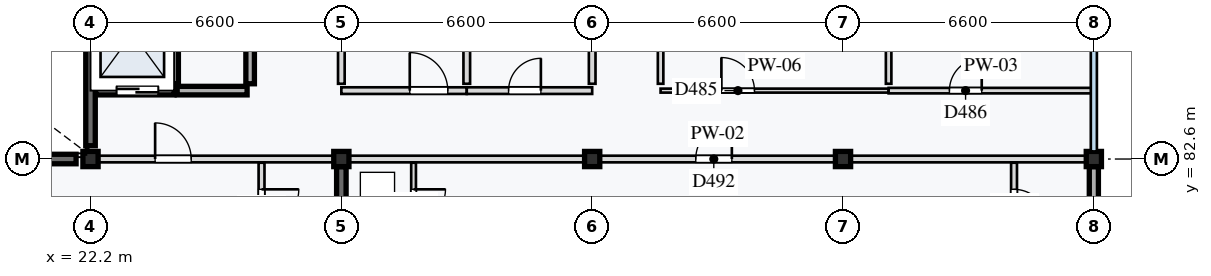
"""IFC4 building model, lengths in metres.
Left out: names, types, materials, properties, quantities, classifications, styles, units other than length and angle.
Written with IfcOpenShell. Run it as: python <this file> out.ifc"""

import sys

from ifc_helpers import new_model, si_unit, direction, frame, frame_2d, origin, origin_2d, place, context, subcontext, project, spatial, rectangle, extrude, element, fill, save


model = new_model("IFC4")
c1 = context("Model", 3, precision=1e-05, world=origin(), true_north=direction((0.0, 1.0)))
c2 = subcontext(c1, "Body", "Model", "MODEL_VIEW")
j1 = project(units=[si_unit("LENGTHUNIT", "METRE"), si_unit("PLANEANGLEUNIT", "RADIAN")], contexts=[c1])
p1 = place(None, origin())
s1 = spatial("IfcSite", under=j1, at=p1, CompositionType="ELEMENT")
p2 = place(p1, origin())
s2 = spatial("IfcBuilding", under=s1, at=p2, CompositionType="ELEMENT")
p3 = place(p2, frame((0.0, 0.0, 50.0)))
s3 = spatial("IfcBuildingStorey", under=s2, at=p3, CompositionType="ELEMENT", Elevation=50.0)
for number, where, z_axis, x_axis in (
    (1, (22.2, 82.6, 0.0), (0.0, 0.0, 1.0), (1.0, 0.0, 0.0)),
    (2, (28.8, 82.6, 0.0), (0.0, 0.0, 1.0), (1.0, 0.0, 0.0)),
    (3, (35.4, 82.6, 0.0), (0.0, 0.0, 1.0), (1.0, 0.0, 0.0)),
    (4, (42.0, 82.6, 0.0), (0.0, 0.0, 1.0), (1.0, 0.0, 0.0)),
    (5, (48.6, 82.6, 0.0), (0.0, 0.0, 1.0), (1.0, 0.0, 0.0)),
):
    element("IfcColumn", number, at=place(p3, frame(where, z_axis=z_axis, x_axis=x_axis)), inside=s3, PredefinedType="COLUMN", context=c2, shape_type="SweptSolid", body=[
        extrude(rectangle(XDim=0.4, YDim=0.4, at=origin_2d()), origin(), (0.0, 0.0, 1.0), 3.2),
    ])
p4 = place(p3, frame((15.98, 82.6, 0.0), z_axis=(0.0, 0.0, 1.0), x_axis=(1.0, 0.0, 0.0)))
e6 = element("IfcWall", 6, at=p4, inside=s3, PredefinedType="SHEAR", context=c2, shape_type="SweptSolid", body=[
    extrude(rectangle(XDim=5.84, YDim=0.25, at=frame_2d((2.92, 0.0))), origin(), (0.0, 0.0, 1.0), 2.98),
])
p5 = place(p3, frame((22.2, 82.95, 0.0), z_axis=(0.0, 0.0, 1.0), x_axis=(0.0, 1.0, 0.0)))
e7 = element("IfcWall", 7, at=p5, inside=s3, PredefinedType="SHEAR", context=c2, shape_type="SweptSolid", body=[
    extrude(rectangle(XDim=2.8, YDim=0.25, at=frame_2d((1.4, 0.0))), origin(), (0.0, 0.0, 1.0), 2.98),
])
p6 = place(p3, frame((28.8, 76.2, 0.0), z_axis=(0.0, 0.0, 1.0), x_axis=(0.0, 1.0, 0.0)))
e8 = element("IfcWall", 8, at=p6, inside=s3, PredefinedType="SHEAR", context=c2, shape_type="SweptSolid", body=[
    extrude(rectangle(XDim=6.2, YDim=0.25, at=frame_2d((3.1, 0.0))), origin(), (0.0, 0.0, 1.0), 2.98),
])
p7 = place(p3, frame((48.6, 76.2, 0.0), z_axis=(0.0, 0.0, 1.0), x_axis=(0.0, 1.0, 0.0)))
e9 = element("IfcWall", 9, at=p7, inside=s3, PredefinedType="STANDARD", context=c2, shape_type="SweptSolid", body=[
    extrude(rectangle(XDim=6.2, YDim=0.24, at=frame_2d((3.1, 0.0))), origin(), (0.0, 0.0, 1.0), 2.65),
])
p8 = place(p3, frame((22.335, 84.4, 0.0), z_axis=(0.0, 0.0, 1.0), x_axis=(1.0, 0.0, 0.0)))
e10 = element("IfcWall", 10, at=p8, inside=s3, PredefinedType="STANDARD", context=c2, shape_type="SweptSolid", body=[
    extrude(rectangle(XDim=2.065, YDim=0.225, at=frame_2d((1.032, 0.0))), origin(), (0.0, 0.0, 1.0), 2.98),
])
p9 = place(p8, frame((0.55, 0.0, 0.0)))
e11 = element("IfcOpeningElement", 11, at=p9, cuts=e10, PredefinedType="OPENING", context=c2, shape_type="SweptSolid", body=[
    extrude(rectangle(XDim=1.1, YDim=2.1, at=frame_2d((0.55, 1.05))), frame((0.0, 0.123, 0.0), z_axis=(0.0, -1.0, 0.0), x_axis=(1.0, 0.0, 0.0)), (0.0, 0.0, 1.0), 0.245),
])
p10 = place(p3, frame((24.48, 84.4, 0.0), z_axis=(0.0, 0.0, 1.0), x_axis=(1.0, 0.0, 0.0)))
e12 = element("IfcWall", 12, at=p10, inside=s3, PredefinedType="STANDARD", context=c2, shape_type="SweptSolid", body=[
    extrude(rectangle(XDim=1.84, YDim=0.225, at=frame_2d((0.92, 0.0))), origin(), (0.0, 0.0, 1.0), 2.98),
])
for number, where, z_axis, x_axis in (
    (13, (24.4, 84.58, 0.0), (0.0, 0.0, 1.0), (0.0, 1.0, 0.0)),
    (14, (26.4, 84.58, 0.0), (0.0, 0.0, 1.0), (0.0, 1.0, 0.0)),
):
    element("IfcWall", number, at=place(p3, frame(where, z_axis=z_axis, x_axis=x_axis)), inside=s3, PredefinedType="STANDARD", context=c2, shape_type="SweptSolid", body=[
        extrude(rectangle(XDim=2.64, YDim=0.225, at=frame_2d((1.32, 0.0))), origin(), (0.0, 0.0, 1.0), 2.98),
    ])
p11 = place(p3, frame((28.8, 84.4, 0.0), z_axis=(0.0, 0.0, 1.0), x_axis=(1.0, 0.0, 0.0)))
e15 = element("IfcWall", 15, at=p11, inside=s3, PredefinedType="PARTITIONING", context=c2, shape_type="SweptSolid", body=[
    extrude(rectangle(XDim=3.3, YDim=0.175, at=frame_2d((1.65, 0.0))), origin(), (0.0, 0.0, 1.0), 2.98),
])
p12 = place(p11, frame((1.8, 0.0, 0.0)))
e16 = element("IfcOpeningElement", 16, at=p12, cuts=e15, PredefinedType="OPENING", context=c2, shape_type="SweptSolid", body=[
    extrude(rectangle(XDim=1.0, YDim=2.1, at=frame_2d((0.5, 1.05))), frame((0.0, 0.097, 0.0), z_axis=(0.0, -1.0, 0.0), x_axis=(1.0, 0.0, 0.0)), (0.0, 0.0, 1.0), 0.195),
])
p13 = place(p3, frame((32.1, 84.4, 0.0), z_axis=(0.0, 0.0, 1.0), x_axis=(1.0, 0.0, 0.0)))
e17 = element("IfcWall", 17, at=p13, inside=s3, PredefinedType="PARTITIONING", context=c2, shape_type="SweptSolid", body=[
    extrude(rectangle(XDim=3.3, YDim=0.175, at=frame_2d((1.65, 0.0))), origin(), (0.0, 0.0, 1.0), 2.98),
])
p14 = place(p13, frame((1.1, 0.0, 0.0)))
e18 = element("IfcOpeningElement", 18, at=p14, cuts=e17, PredefinedType="OPENING", context=c2, shape_type="SweptSolid", body=[
    extrude(rectangle(XDim=0.85, YDim=2.0, at=frame_2d((0.425, 1.0))), frame((0.0, 0.097, 0.0), z_axis=(0.0, -1.0, 0.0), x_axis=(1.0, 0.0, 0.0)), (0.0, 0.0, 1.0), 0.195),
])
for number, where, z_axis, x_axis in (
    (19, (28.8, 84.58, 0.0), (0.0, 0.0, 1.0), (0.0, 1.0, 0.0)),
    (20, (32.1, 84.58, 0.0), (0.0, 0.0, 1.0), (0.0, 1.0, 0.0)),
    (21, (35.4, 84.58, 0.0), (0.0, 0.0, 1.0), (0.0, 1.0, 0.0)),
):
    element("IfcWall", number, at=place(p3, frame(where, z_axis=z_axis, x_axis=x_axis)), inside=s3, PredefinedType="PARTITIONING", context=c2, shape_type="SweptSolid", body=[
        extrude(rectangle(XDim=1.14, YDim=0.175, at=frame_2d((0.57, 0.0))), origin(), (0.0, 0.0, 1.0), 2.98),
    ])
p15 = place(p3, frame((37.2, 84.4, 0.0), z_axis=(0.0, 0.0, 1.0), x_axis=(1.0, 0.0, 0.0)))
e22 = element("IfcWall", 22, at=p15, inside=s3, PredefinedType="PARTITIONING", context=c2, shape_type="SweptSolid", body=[
    extrude(rectangle(XDim=6.0, YDim=0.105, at=frame_2d((3.0, 0.0))), origin(), (0.0, 0.0, 1.0), 2.98),
])
p16 = place(p15, frame((1.6, 0.0, 0.0)))
e23 = element("IfcOpeningElement", 23, at=p16, cuts=e22, PredefinedType="OPENING", context=c2, shape_type="SweptSolid", body=[
    extrude(rectangle(XDim=0.87, YDim=2.08, at=frame_2d((0.435, 1.04))), frame((0.0, 0.062, 0.0), z_axis=(0.0, -1.0, 0.0), x_axis=(1.0, 0.0, 0.0)), (0.0, 0.0, 1.0), 0.125),
])
p17 = place(p3, frame((43.2, 84.4, 0.0), z_axis=(0.0, 0.0, 1.0), x_axis=(1.0, 0.0, 0.0)))
e24 = element("IfcWall", 24, at=p17, inside=s3, PredefinedType="PARTITIONING", context=c2, shape_type="SweptSolid", body=[
    extrude(rectangle(XDim=5.4, YDim=0.145, at=frame_2d((2.7, 0.0))), origin(), (0.0, 0.0, 1.0), 2.98),
])
p18 = place(p17, frame((1.6, 0.0, 0.0)))
e25 = element("IfcOpeningElement", 25, at=p18, cuts=e24, PredefinedType="OPENING", context=c2, shape_type="SweptSolid", body=[
    extrude(rectangle(XDim=0.85, YDim=2.1, at=frame_2d((0.425, 1.05))), frame((0.0, 0.083, 0.0), z_axis=(0.0, -1.0, 0.0), x_axis=(1.0, 0.0, 0.0)), (0.0, 0.0, 1.0), 0.165),
])
for number, where, z_axis, x_axis in (
    (26, (43.2, 84.58, 0.0), (0.0, 0.0, 1.0), (0.0, 1.0, 0.0)),
    (27, (37.2, 84.58, 0.0), (0.0, 0.0, 1.0), (0.0, 1.0, 0.0)),
):
    element("IfcWall", number, at=place(p3, frame(where, z_axis=z_axis, x_axis=x_axis)), inside=s3, PredefinedType="PARTITIONING", context=c2, shape_type="SweptSolid", body=[
        extrude(rectangle(XDim=2.64, YDim=0.145, at=frame_2d((1.32, 0.0))), origin(), (0.0, 0.0, 1.0), 2.98),
    ])
p19 = place(p3, frame((22.2, 82.6, 0.0), z_axis=(0.0, 0.0, 1.0), x_axis=(1.0, 0.0, 0.0)))
e28 = element("IfcWall", 28, at=p19, inside=s3, PredefinedType="PARTITIONING", context=c2, shape_type="SweptSolid", body=[
    extrude(rectangle(XDim=6.6, YDim=0.175, at=frame_2d((3.3, 0.0))), origin(), (0.0, 0.0, 1.0), 2.55),
])
p20 = place(p19, frame((1.7, 0.0, 0.0)))
e29 = element("IfcOpeningElement", 29, at=p20, cuts=e28, PredefinedType="OPENING", context=c2, shape_type="SweptSolid", body=[
    extrude(rectangle(XDim=0.95, YDim=2.1, at=frame_2d((0.475, 1.05))), frame((0.0, 0.097, 0.0), z_axis=(0.0, -1.0, 0.0), x_axis=(1.0, 0.0, 0.0)), (0.0, 0.0, 1.0), 0.195),
])
p21 = place(p3, frame((26.7, 82.502, 0.0), z_axis=(0.0, 0.0, 1.0), x_axis=(0.0, -1.0, 0.0)))
e30 = element("IfcWall", 30, at=p21, inside=s3, PredefinedType="PARTITIONING", context=c2, shape_type="SweptSolid", body=[
    extrude(rectangle(XDim=2.302, YDim=0.155, at=frame_2d((1.151, 0.0))), origin(), (0.0, 0.0, 1.0), 2.98),
])
p22 = place(p21, frame((0.7, 0.0, 0.0)))
e31 = element("IfcOpeningElement", 31, at=p22, cuts=e30, PredefinedType="OPENING", context=c2, shape_type="SweptSolid", body=[
    extrude(rectangle(XDim=0.98, YDim=2.12, at=frame_2d((0.49, 1.06))), frame((0.0, 0.087, 0.0), z_axis=(0.0, -1.0, 0.0), x_axis=(1.0, 0.0, 0.0)), (0.0, 0.0, 1.0), 0.175),
])
p23 = place(p3, frame((28.8, 82.6, 0.0), z_axis=(0.0, 0.0, 1.0), x_axis=(1.0, 0.0, 0.0)))
e32 = element("IfcWall", 32, at=p23, inside=s3, PredefinedType="PARTITIONING", context=c2, shape_type="SweptSolid", body=[
    extrude(rectangle(XDim=19.8, YDim=0.175, at=frame_2d((9.9, 0.0))), origin(), (0.0, 0.0, 1.0), 2.55),
])
p24 = place(p23, frame((9.325, 0.0, 0.0)))
e33 = element("IfcOpeningElement", 33, at=p24, cuts=e32, PredefinedType="OPENING", context=c2, shape_type="SweptSolid", body=[
    extrude(rectangle(XDim=0.95, YDim=2.16, at=frame_2d((0.475, 1.08))), frame((0.0, 0.097, 0.0), z_axis=(0.0, -1.0, 0.0), x_axis=(1.0, 0.0, 0.0)), (0.0, 0.0, 1.0), 0.195),
])
p25 = place(p3, frame((30.7, 82.502, 0.0), z_axis=(0.0, 0.0, 1.0), x_axis=(0.0, -1.0, 0.0)))
e34 = element("IfcWall", 34, at=p25, inside=s3, PredefinedType="PARTITIONING", context=c2, shape_type="SweptSolid", body=[
    extrude(rectangle(XDim=2.302, YDim=0.125, at=frame_2d((1.151, 0.0))), origin(), (0.0, 0.0, 1.0), 2.98),
])
p26 = place(p25, frame((0.7, 0.0, 0.0)))
e35 = element("IfcOpeningElement", 35, at=p26, cuts=e34, PredefinedType="OPENING", context=c2, shape_type="SweptSolid", body=[
    extrude(rectangle(XDim=0.84, YDim=2.06, at=frame_2d((0.42, 1.03))), frame((0.0, 0.073, 0.0), z_axis=(0.0, -1.0, 0.0), x_axis=(1.0, 0.0, 0.0)), (0.0, 0.0, 1.0), 0.145),
])
p27 = place(p3, frame((46.5, 82.502, 0.0), z_axis=(0.0, 0.0, 1.0), x_axis=(0.0, -1.0, 0.0)))
e36 = element("IfcWall", 36, at=p27, inside=s3, PredefinedType="PARTITIONING", context=c2, shape_type="SweptSolid", body=[
    extrude(rectangle(XDim=2.302, YDim=0.155, at=frame_2d((1.151, 0.0))), origin(), (0.0, 0.0, 1.0), 2.98),
])
p28 = place(p27, frame((0.7, 0.0, 0.0)))
e37 = element("IfcOpeningElement", 37, at=p28, cuts=e36, PredefinedType="OPENING", context=c2, shape_type="SweptSolid", body=[
    extrude(rectangle(XDim=0.87, YDim=2.08, at=frame_2d((0.435, 1.04))), frame((0.0, 0.087, 0.0), z_axis=(0.0, -1.0, 0.0), x_axis=(1.0, 0.0, 0.0)), (0.0, 0.0, 1.0), 0.175),
])
p29 = place(p9, origin())
e38 = element("IfcDoor", 38, at=p29, inside=s3, OperationType="DOUBLE_DOOR_SLIDING", PredefinedType="DOOR", context=c2, shape_type="SweptSolid", body=[
    extrude(rectangle(XDim=1.1, YDim=2.1, at=frame_2d((0.55, 1.05))), frame((0.0, 0.025, 0.0), z_axis=(0.0, -1.0, 0.0), x_axis=(1.0, 0.0, 0.0)), (0.0, 0.0, 1.0), 0.05),
])
fill(e11, e38)
p30 = place(p12, origin())
e39 = element("IfcDoor", 39, at=p30, inside=s3, OperationType="SINGLE_SWING_LEFT", PredefinedType="DOOR", context=c2, shape_type="SweptSolid", body=[
    extrude(rectangle(XDim=1.0, YDim=2.1, at=frame_2d((0.5, 1.05))), frame((0.0, 0.025, 0.0), z_axis=(0.0, -1.0, 0.0), x_axis=(1.0, 0.0, 0.0)), (0.0, 0.0, 1.0), 0.05),
])
fill(e16, e39)
p31 = place(p14, origin())
e40 = element("IfcDoor", 40, at=p31, inside=s3, OperationType="SINGLE_SWING_RIGHT", PredefinedType="DOOR", context=c2, shape_type="SweptSolid", body=[
    extrude(rectangle(XDim=0.85, YDim=2.0, at=frame_2d((0.425, 1.0))), frame((0.0, 0.025, 0.0), z_axis=(0.0, -1.0, 0.0), x_axis=(1.0, 0.0, 0.0)), (0.0, 0.0, 1.0), 0.05),
])
fill(e18, e40)
p32 = place(p16, origin())
e41 = element("IfcDoor", 41, at=p32, inside=s3, OperationType="SINGLE_SWING_LEFT", PredefinedType="DOOR", context=c2, shape_type="SweptSolid", body=[
    extrude(rectangle(XDim=0.87, YDim=2.08, at=frame_2d((0.435, 1.04))), frame((0.0, 0.025, 0.0), z_axis=(0.0, -1.0, 0.0), x_axis=(1.0, 0.0, 0.0)), (0.0, 0.0, 1.0), 0.05),
])
fill(e23, e41)
p33 = place(p18, origin())
e42 = element("IfcDoor", 42, at=p33, inside=s3, OperationType="SINGLE_SWING_RIGHT", PredefinedType="DOOR", context=c2, shape_type="SweptSolid", body=[
    extrude(rectangle(XDim=0.85, YDim=2.1, at=frame_2d((0.425, 1.05))), frame((0.0, 0.025, 0.0), z_axis=(0.0, -1.0, 0.0), x_axis=(1.0, 0.0, 0.0)), (0.0, 0.0, 1.0), 0.05),
])
fill(e25, e42)
p34 = place(p20, origin())
e43 = element("IfcDoor", 43, at=p34, inside=s3, OperationType="SINGLE_SWING_LEFT", PredefinedType="DOOR", context=c2, shape_type="SweptSolid", body=[
    extrude(rectangle(XDim=0.95, YDim=2.1, at=frame_2d((0.475, 1.05))), frame((0.0, 0.025, 0.0), z_axis=(0.0, -1.0, 0.0), x_axis=(1.0, 0.0, 0.0)), (0.0, 0.0, 1.0), 0.05),
])
fill(e29, e43)
p35 = place(p22, origin())
e44 = element("IfcDoor", 44, at=p35, inside=s3, OperationType="SINGLE_SWING_LEFT", PredefinedType="DOOR", context=c2, shape_type="SweptSolid", body=[
    extrude(rectangle(XDim=0.98, YDim=2.12, at=frame_2d((0.49, 1.06))), frame((0.0, 0.025, 0.0), z_axis=(0.0, -1.0, 0.0), x_axis=(1.0, 0.0, 0.0)), (0.0, 0.0, 1.0), 0.05),
])
fill(e31, e44)
p36 = place(p24, origin())
e45 = element("IfcDoor", 45, at=p36, inside=s3, OperationType="SINGLE_SWING_RIGHT", PredefinedType="DOOR", context=c2, shape_type="SweptSolid", body=[
    extrude(rectangle(XDim=0.95, YDim=2.16, at=frame_2d((0.475, 1.08))), frame((0.0, 0.025, 0.0), z_axis=(0.0, -1.0, 0.0), x_axis=(1.0, 0.0, 0.0)), (0.0, 0.0, 1.0), 0.05),
])
fill(e33, e45)
p37 = place(p26, origin())
e46 = element("IfcDoor", 46, at=p37, inside=s3, OperationType="SINGLE_SWING_LEFT", PredefinedType="DOOR", context=c2, shape_type="SweptSolid", body=[
    extrude(rectangle(XDim=0.84, YDim=2.06, at=frame_2d((0.42, 1.03))), frame((0.0, 0.025, 0.0), z_axis=(0.0, -1.0, 0.0), x_axis=(1.0, 0.0, 0.0)), (0.0, 0.0, 1.0), 0.05),
])
fill(e35, e46)
p38 = place(p28, origin())
e47 = element("IfcDoor", 47, at=p38, inside=s3, OperationType="SINGLE_SWING_RIGHT", PredefinedType="DOOR", context=c2, shape_type="SweptSolid", body=[
    extrude(rectangle(XDim=0.87, YDim=2.08, at=frame_2d((0.435, 1.04))), frame((0.0, 0.025, 0.0), z_axis=(0.0, -1.0, 0.0), x_axis=(1.0, 0.0, 0.0)), (0.0, 0.0, 1.0), 0.05),
])
fill(e37, e47)
save(model, sys.argv[1])
